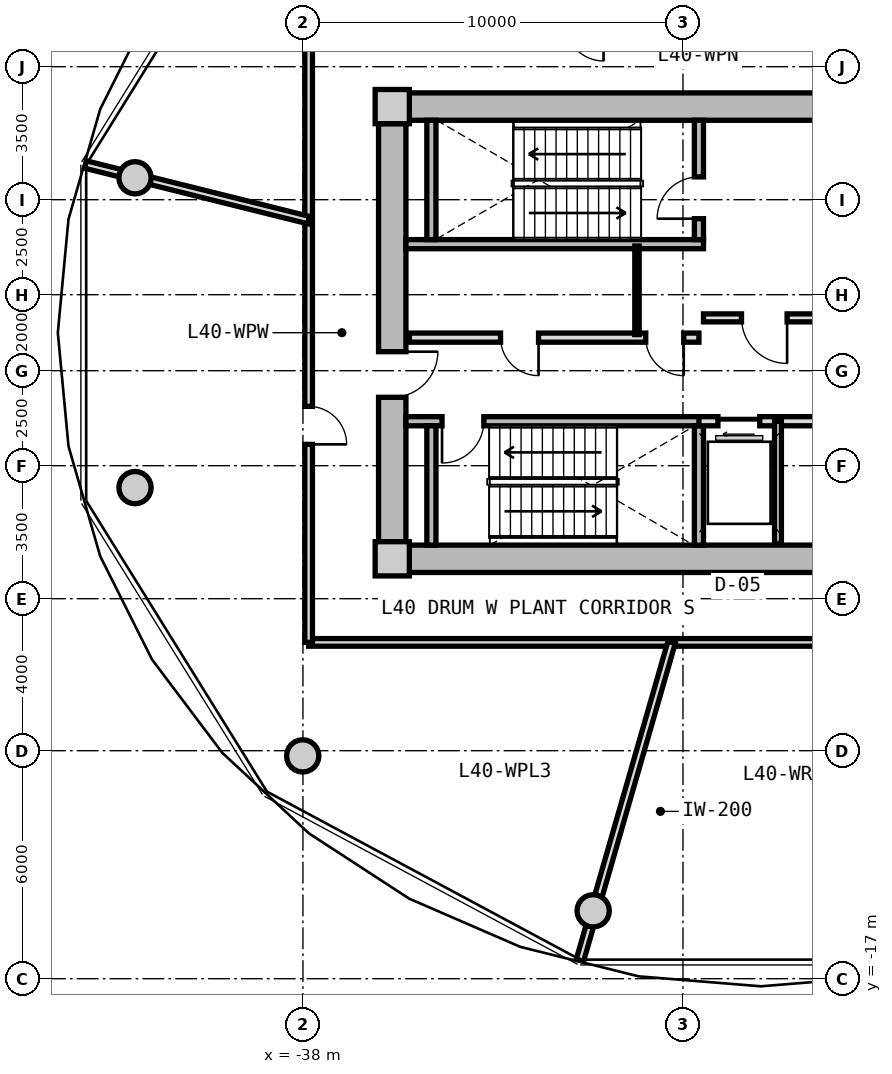
"""IFC4 building model, lengths in metres.
Left out: names, types, materials, properties, quantities, classifications, styles, units other than length and angle.
Written with IfcOpenShell. Run it as: python <this file> out.ifc"""

import sys

from ifc_helpers import new_model, si_unit, direction, frame, frame_2d, origin, origin_2d, place, context, subcontext, project, spatial, rectangle, circle, extrude, source, transform, mapped, element, fill, save


model = new_model("IFC4")
c1 = context("Model", 3, precision=1e-05, world=origin(), true_north=direction((0.0, 1.0)))
c2 = subcontext(c1, "Body", "Model", "MODEL_VIEW")
j1 = project(units=[si_unit("LENGTHUNIT", "METRE"), si_unit("PLANEANGLEUNIT", "RADIAN")], contexts=[c1])
p1 = place(None, origin())
s1 = spatial("IfcSite", under=j1, at=p1, CompositionType="ELEMENT")
p2 = place(p1, origin())
s2 = spatial("IfcBuilding", under=s1, at=p2, CompositionType="ELEMENT")
p3 = place(p2, frame((0.0, 0.0, 129.8)))
s3 = spatial("IfcBuildingStorey", under=s2, at=p3, CompositionType="ELEMENT", Elevation=129.8)
m1 = source(origin(), c2, "Body", "SweptSolid", [
    extrude(rectangle(XDim=0.9, YDim=0.9, at=origin_2d()), origin(), (0.0, 0.0, 1.0), 4.5),
])
for number, where, z_axis, x_axis in (
    (1, (-35.65, -5.95, 0.0), (0.0, 0.0, 1.0), (1.0, 0.0, 0.0)),
    (2, (-35.65, 5.95, 0.0), (0.0, 0.0, 1.0), (1.0, 0.0, 0.0)),
):
    element("IfcColumn", number, at=place(p3, frame(where, z_axis=z_axis, x_axis=x_axis)), inside=s3, PredefinedType="COLUMN", context=c2, shape_type="MappedRepresentation", body=[
        mapped(m1, transform((0.0, 0.0, 0.0), x_axis=(1.0, 0.0, 0.0), y_axis=(0.0, 1.0, 0.0), z_axis=(0.0, 0.0, 1.0), scale=1.0)),
    ])
m2 = source(origin(), c2, "Body", "SweptSolid", [
    extrude(rectangle(XDim=14.4, YDim=0.72, at=frame_2d((7.2, 0.0))), origin(), (0.0, 0.0, 1.0), 4.08),
])
for number, where, z_axis, x_axis in (
    (3, (-35.2, 5.95, 0.0), (0.0, 0.0, 1.0), (1.0, 0.0, 0.0)),
    (4, (-20.8, -5.95, 0.0), (0.0, 0.0, 1.0), (-1.0, 0.0, 0.0)),
):
    element("IfcWall", number, at=place(p3, frame(where, z_axis=z_axis, x_axis=x_axis)), inside=s3, PredefinedType="SHEAR", context=c2, shape_type="MappedRepresentation", body=[
        mapped(m2, transform((0.0, 0.0, 0.0), x_axis=(1.0, 0.0, 0.0), y_axis=(0.0, 1.0, 0.0), z_axis=(0.0, 0.0, 1.0), scale=1.0)),
    ])
m3 = source(origin(), c2, "Body", "SweptSolid", [
    extrude(rectangle(XDim=11.0, YDim=0.72, at=frame_2d((5.5, 0.0))), origin(), (0.0, 0.0, 1.0), 4.08),
])
p4 = place(p3, frame((-35.65, -5.5, 0.0), z_axis=(0.0, 0.0, 1.0), x_axis=(0.0, 1.0, 0.0)))
e5 = element("IfcWall", 5, at=p4, inside=s3, PredefinedType="SHEAR", context=c2, shape_type="MappedRepresentation", body=[
    mapped(m3, transform((0.0, 0.0, 0.0), x_axis=(1.0, 0.0, 0.0), y_axis=(0.0, 1.0, 0.0), z_axis=(0.0, 0.0, 1.0), scale=1.0)),
])
p5 = place(p4, frame((3.8, 0.0, 0.0)))
e6 = element("IfcOpeningElement", 6, at=p5, cuts=e5, PredefinedType="OPENING", context=c2, shape_type="SweptSolid", body=[
    extrude(rectangle(XDim=1.2, YDim=2.15, at=frame_2d((0.6, 1.075))), frame((0.0, 0.37, 0.0), z_axis=(0.0, -1.0, 0.0), x_axis=(1.0, 0.0, 0.0)), (0.0, 0.0, 1.0), 0.74),
])
m4 = source(origin(), c2, "Body", "SweptSolid", [
    extrude(circle(Radius=0.425, at=origin_2d()), origin(), (0.0, 0.0, 1.0), 4.08),
])
for number, where, z_axis, x_axis in (
    (7, (-42.419, 4.076, 0.0), (0.0, 0.0, 1.0), (1.0, 0.0, 0.0)),
    (8, (-42.419, -4.076, 0.0), (0.0, 0.0, 1.0), (1.0, 0.0, 0.0)),
    (9, (-38.006, -11.137, 0.0), (0.0, 0.0, 1.0), (1.0, 0.0, 0.0)),
    (10, (-30.363, -15.213, 0.0), (0.0, 0.0, 1.0), (1.0, 0.0, 0.0)),
):
    element("IfcColumn", number, at=place(p3, frame(where, z_axis=z_axis, x_axis=x_axis)), inside=s3, PredefinedType="COLUMN", context=c2, shape_type="MappedRepresentation", body=[
        mapped(m4, transform((0.0, 0.0, 0.0), x_axis=(1.0, 0.0, 0.0), y_axis=(0.0, 1.0, 0.0), z_axis=(0.0, 0.0, 1.0), scale=1.0)),
    ])
m5 = source(origin(), c2, "Body", "SweptSolid", [
    extrude(rectangle(XDim=7.83, YDim=0.24, at=frame_2d((3.915, 0.0))), origin(), (0.0, 0.0, 1.0), 4.08),
])
p6 = place(p3, frame((-35.29, 2.33, 0.0), z_axis=(0.0, 0.0, 1.0), x_axis=(1.0, 0.0, 0.0)))
e11 = element("IfcWall", 11, at=p6, inside=s3, PredefinedType="PARTITIONING", context=c2, shape_type="MappedRepresentation", body=[
    mapped(m5, transform((0.0, 0.0, 0.0), x_axis=(1.0, 0.0, 0.0), y_axis=(0.0, 1.0, 0.0), z_axis=(0.0, 0.0, 1.0), scale=1.0)),
])
m6 = source(origin(), c2, "Body", "SweptSolid", [
    extrude(rectangle(XDim=3.14, YDim=0.24, at=frame_2d((1.57, 0.0))), origin(), (0.0, 0.0, 1.0), 4.08),
])
p7 = place(p3, frame((-34.62, 2.45, 0.0), z_axis=(0.0, 0.0, 1.0), x_axis=(0.0, 1.0, 0.0)))
e12 = element("IfcWall", 12, at=p7, inside=s3, PredefinedType="PARTITIONING", context=c2, shape_type="MappedRepresentation", body=[
    mapped(m6, transform((0.0, 0.0, 0.0), x_axis=(1.0, 0.0, 0.0), y_axis=(0.0, 1.0, 0.0), z_axis=(0.0, 0.0, 1.0), scale=1.0)),
])
p8 = place(p3, frame((-27.58, 2.45, 0.0), z_axis=(0.0, 0.0, 1.0), x_axis=(0.0, 1.0, 0.0)))
e13 = element("IfcWall", 13, at=p8, inside=s3, PredefinedType="PARTITIONING", context=c2, shape_type="MappedRepresentation", body=[
    mapped(m6, transform((0.0, 0.0, 0.0), x_axis=(1.0, 0.0, 0.0), y_axis=(0.0, 1.0, 0.0), z_axis=(0.0, 0.0, 1.0), scale=1.0)),
])
p9 = place(p8, frame((0.55, 0.0, 0.0)))
e14 = element("IfcOpeningElement", 14, at=p9, cuts=e13, PredefinedType="OPENING", context=c2, shape_type="SweptSolid", body=[
    extrude(rectangle(XDim=1.1, YDim=2.15, at=frame_2d((0.55, 1.075))), frame((0.0, 0.13, 0.0), z_axis=(0.0, -1.0, 0.0), x_axis=(1.0, 0.0, 0.0)), (0.0, 0.0, 1.0), 0.26),
])
p10 = place(p3, frame((-35.29, -2.33, 0.0), z_axis=(0.0, 0.0, 1.0), x_axis=(1.0, 0.0, 0.0)))
e15 = element("IfcWall", 15, at=p10, inside=s3, PredefinedType="PARTITIONING", context=c2, shape_type="MappedRepresentation", body=[
    mapped(m5, transform((0.0, 0.0, 0.0), x_axis=(1.0, 0.0, 0.0), y_axis=(0.0, 1.0, 0.0), z_axis=(0.0, 0.0, 1.0), scale=1.0)),
])
p11 = place(p10, frame((0.95, 0.0, 0.0)))
e16 = element("IfcOpeningElement", 16, at=p11, cuts=e15, PredefinedType="OPENING", context=c2, shape_type="SweptSolid", body=[
    extrude(rectangle(XDim=1.1, YDim=2.15, at=frame_2d((0.55, 1.075))), frame((0.0, 0.13, 0.0), z_axis=(0.0, -1.0, 0.0), x_axis=(1.0, 0.0, 0.0)), (0.0, 0.0, 1.0), 0.26),
])
for number, where, z_axis, x_axis in (
    (17, (-34.62, -5.59, 0.0), (0.0, 0.0, 1.0), (0.0, 1.0, 0.0)),
    (18, (-27.58, -5.59, 0.0), (0.0, 0.0, 1.0), (0.0, 1.0, 0.0)),
):
    element("IfcWall", number, at=place(p3, frame(where, z_axis=z_axis, x_axis=x_axis)), inside=s3, PredefinedType="PARTITIONING", context=c2, shape_type="MappedRepresentation", body=[
        mapped(m6, transform((0.0, 0.0, 0.0), x_axis=(1.0, 0.0, 0.0), y_axis=(0.0, 1.0, 0.0), z_axis=(0.0, 0.0, 1.0), scale=1.0)),
    ])
m7 = source(origin(), c2, "Body", "SweptSolid", [
    extrude(rectangle(XDim=6.66, YDim=0.21, at=frame_2d((3.33, 0.0))), origin(), (0.0, 0.0, 1.0), 4.065),
])
p12 = place(p3, frame((-27.46, 0.39, 0.0), z_axis=(0.0, 0.0, 1.0), x_axis=(1.0, 0.0, 0.0)))
e19 = element("IfcWall", 19, at=p12, inside=s3, PredefinedType="PARTITIONING", context=c2, shape_type="MappedRepresentation", body=[
    mapped(m7, transform((0.0, 0.0, 0.0), x_axis=(1.0, 0.0, 0.0), y_axis=(0.0, 1.0, 0.0), z_axis=(0.0, 0.0, 1.0), scale=1.0)),
])
p13 = place(p12, frame((1.0, 0.0, 0.0)))
e20 = element("IfcOpeningElement", 20, at=p13, cuts=e19, PredefinedType="OPENING", context=c2, shape_type="SweptSolid", body=[
    extrude(rectangle(XDim=1.2, YDim=2.15, at=frame_2d((0.6, 1.075))), frame((0.0, 0.115, 0.0), z_axis=(0.0, -1.0, 0.0), x_axis=(1.0, 0.0, 0.0)), (0.0, 0.0, 1.0), 0.23),
])
m8 = source(origin(), c2, "Body", "SweptSolid", [
    extrude(rectangle(XDim=7.62, YDim=0.24, at=frame_2d((3.81, 0.0))), origin(), (0.0, 0.0, 1.0), 4.065),
])
p14 = place(p3, frame((-35.2, -0.13, 0.0), z_axis=(0.0, 0.0, 1.0), x_axis=(1.0, 0.0, 0.0)))
e21 = element("IfcWall", 21, at=p14, inside=s3, PredefinedType="PARTITIONING", context=c2, shape_type="MappedRepresentation", body=[
    mapped(m8, transform((0.0, 0.0, 0.0), x_axis=(1.0, 0.0, 0.0), y_axis=(0.0, 1.0, 0.0), z_axis=(0.0, 0.0, 1.0), scale=1.0)),
])
p15 = place(p14, frame((6.22, 0.0, 0.0)))
e22 = element("IfcOpeningElement", 22, at=p15, cuts=e21, PredefinedType="OPENING", context=c2, shape_type="SweptSolid", body=[
    extrude(rectangle(XDim=1.0, YDim=2.1, at=frame_2d((0.5, 1.05))), frame((0.0, 0.13, 0.0), z_axis=(0.0, -1.0, 0.0), x_axis=(1.0, 0.0, 0.0)), (0.0, 0.0, 1.0), 0.26),
])
p16 = place(p14, frame((2.4, 0.0, 0.0)))
e23 = element("IfcOpeningElement", 23, at=p16, cuts=e21, PredefinedType="OPENING", context=c2, shape_type="SweptSolid", body=[
    extrude(rectangle(XDim=1.0, YDim=2.1, at=frame_2d((0.5, 1.05))), frame((0.0, 0.13, 0.0), z_axis=(0.0, -1.0, 0.0), x_axis=(1.0, 0.0, 0.0)), (0.0, 0.0, 1.0), 0.26),
])
m9 = source(origin(), c2, "Body", "SweptSolid", [
    extrude(rectangle(XDim=2.33, YDim=0.115, at=frame_2d((1.165, 0.0))), origin(), (0.0, 0.0, 1.0), 4.065),
])
p17 = place(p3, frame((-29.21, -0.05, 0.0), z_axis=(0.0, 0.0, 1.0), x_axis=(0.0, 1.0, 0.0)))
e24 = element("IfcWall", 24, at=p17, inside=s3, PredefinedType="PARTITIONING", context=c2, shape_type="MappedRepresentation", body=[
    mapped(m9, transform((0.0, 0.0, 0.0), x_axis=(1.0, 0.0, 0.0), y_axis=(0.0, 1.0, 0.0), z_axis=(0.0, 0.0, 1.0), scale=1.0)),
])
m10 = source(origin(), c2, "Body", "SweptSolid", [
    extrude(rectangle(XDim=4.13, YDim=0.24, at=frame_2d((2.065, 0.0))), origin(), (0.0, 0.0, 1.0), 4.065),
])
p18 = place(p3, frame((-27.58, -2.33, 0.0), z_axis=(0.0, 0.0, 1.0), x_axis=(1.0, 0.0, 0.0)))
e25 = element("IfcWall", 25, at=p18, inside=s3, PredefinedType="PARTITIONING", context=c2, shape_type="MappedRepresentation", body=[
    mapped(m10, transform((0.0, 0.0, 0.0), x_axis=(1.0, 0.0, 0.0), y_axis=(0.0, 1.0, 0.0), z_axis=(0.0, 0.0, 1.0), scale=1.0)),
])
p19 = place(p18, frame((0.5, 0.0, 0.0)))
e26 = element("IfcOpeningElement", 26, at=p19, cuts=e25, PredefinedType="OPENING", context=c2, shape_type="SweptSolid", body=[
    extrude(rectangle(XDim=1.1, YDim=2.2, at=frame_2d((0.55, 1.1))), frame((0.0, 0.13, 0.0), z_axis=(0.0, -1.0, 0.0), x_axis=(1.0, 0.0, 0.0)), (0.0, 0.0, 1.0), 0.26),
])
m11 = source(origin(), c2, "Body", "SweptSolid", [
    extrude(rectangle(XDim=3.22, YDim=0.18, at=frame_2d((1.61, 0.0))), origin(), (0.0, 0.0, 1.0), 4.065),
])
p20 = place(p3, frame((-25.5, -5.55, 0.0), z_axis=(0.0, 0.0, 1.0), x_axis=(0.0, 1.0, 0.0)))
e27 = element("IfcWall", 27, at=p20, inside=s3, PredefinedType="PARTITIONING", context=c2, shape_type="MappedRepresentation", body=[
    mapped(m11, transform((0.0, 0.0, 0.0), x_axis=(1.0, 0.0, 0.0), y_axis=(0.0, 1.0, 0.0), z_axis=(0.0, 0.0, 1.0), scale=1.0)),
])
m12 = source(origin(), c2, "Body", "SweptSolid", [
    extrude(rectangle(XDim=19.7, YDim=0.2, at=frame_2d((9.85, 0.0))), origin(), (0.0, 0.0, 1.0), 4.065),
])
p21 = place(p3, frame((-18.15, -8.15, 0.0), z_axis=(0.0, 0.0, 1.0), x_axis=(-1.0, 0.0, 0.0)))
e28 = element("IfcWall", 28, at=p21, inside=s3, PredefinedType="PARTITIONING", context=c2, shape_type="MappedRepresentation", body=[
    mapped(m12, transform((0.0, 0.0, 0.0), x_axis=(1.0, 0.0, 0.0), y_axis=(0.0, 1.0, 0.0), z_axis=(0.0, 0.0, 1.0), scale=1.0)),
])
p22 = place(p21, frame((4.586, 0.0, 0.0)))
e29 = element("IfcOpeningElement", 29, at=p22, cuts=e28, PredefinedType="OPENING", context=c2, shape_type="SweptSolid", body=[
    extrude(rectangle(XDim=1.25, YDim=2.2, at=frame_2d((0.625, 1.1))), frame((0.0, 0.11, 0.0), z_axis=(0.0, -1.0, 0.0), x_axis=(1.0, 0.0, 0.0)), (0.0, 0.0, 1.0), 0.22),
])
m13 = source(origin(), c2, "Body", "SweptSolid", [
    extrude(rectangle(XDim=16.3, YDim=0.2, at=frame_2d((8.15, 0.0))), origin(), (0.0, 0.0, 1.0), 4.065),
])
p23 = place(p3, frame((-37.85, -8.15, 0.0), z_axis=(0.0, 0.0, 1.0), x_axis=(0.0, 1.0, 0.0)))
e30 = element("IfcWall", 30, at=p23, inside=s3, PredefinedType="PARTITIONING", context=c2, shape_type="MappedRepresentation", body=[
    mapped(m13, transform((0.0, 0.0, 0.0), x_axis=(1.0, 0.0, 0.0), y_axis=(0.0, 1.0, 0.0), z_axis=(0.0, 0.0, 1.0), scale=1.0)),
])
p24 = place(p23, frame((5.211, 0.0, 0.0)))
e31 = element("IfcOpeningElement", 31, at=p24, cuts=e30, PredefinedType="OPENING", context=c2, shape_type="SweptSolid", body=[
    extrude(rectangle(XDim=1.0, YDim=2.1, at=frame_2d((0.5, 1.05))), frame((0.0, 0.11, 0.0), z_axis=(0.0, -1.0, 0.0), x_axis=(1.0, 0.0, 0.0)), (0.0, 0.0, 1.0), 0.22),
])
m14 = source(origin(), c2, "Body", "SweptSolid", [
    extrude(rectangle(XDim=8.708, YDim=0.2, at=frame_2d((4.354, 0.0))), origin(), (0.0, 0.0, 1.0), 4.065),
])
p25 = place(p3, frame((-28.3, -8.15, 0.0), z_axis=(0.0, 0.0, 1.0), x_axis=(-0.277019790717, -0.960864212858, 0.0)))
e32 = element("IfcWall", 32, at=p25, inside=s3, PredefinedType="PARTITIONING", context=c2, shape_type="MappedRepresentation", body=[
    mapped(m14, transform((0.0, 0.0, 0.0), x_axis=(1.0, 0.0, 0.0), y_axis=(0.0, 1.0, 0.0), z_axis=(0.0, 0.0, 1.0), scale=1.0)),
])
m15 = source(origin(), c2, "Body", "SweptSolid", [
    extrude(rectangle(XDim=6.052, YDim=0.2, at=frame_2d((3.026, 0.0))), origin(), (0.0, 0.0, 1.0), 4.065),
])
p26 = place(p3, frame((-37.85, 2.963, 0.0), z_axis=(0.0, 0.0, 1.0), x_axis=(-0.970369863069, 0.24162435483, 0.0)))
e33 = element("IfcWall", 33, at=p26, inside=s3, PredefinedType="PARTITIONING", context=c2, shape_type="MappedRepresentation", body=[
    mapped(m15, transform((0.0, 0.0, 0.0), x_axis=(1.0, 0.0, 0.0), y_axis=(0.0, 1.0, 0.0), z_axis=(0.0, 0.0, 1.0), scale=1.0)),
])
m16 = source(origin(), c2, "Body", "SweptSolid", [
    extrude(rectangle(XDim=1.1, YDim=2.15, at=frame_2d((0.55, 1.075))), frame((0.0, 0.025, 0.0), z_axis=(0.0, -1.0, 0.0), x_axis=(1.0, 0.0, 0.0)), (0.0, 0.0, 1.0), 0.05),
])
p27 = place(p9, origin())
e34 = element("IfcDoor", 34, at=p27, inside=s3, OperationType="SINGLE_SWING_LEFT", PredefinedType="DOOR", context=c2, shape_type="MappedRepresentation", body=[
    mapped(m16, transform((0.0, 0.0, 0.0), x_axis=(1.0, 0.0, 0.0), y_axis=(0.0, 1.0, 0.0), z_axis=(0.0, 0.0, 1.0), scale=1.0)),
])
fill(e14, e34)
p28 = place(p11, frame((1.1, 0.0, 0.0), z_axis=(0.0, 0.0, 1.0), x_axis=(-1.0, 0.0, 0.0)))
e35 = element("IfcDoor", 35, at=p28, inside=s3, OperationType="SINGLE_SWING_RIGHT", PredefinedType="DOOR", context=c2, shape_type="MappedRepresentation", body=[
    mapped(m16, transform((0.0, 0.0, 0.0), x_axis=(1.0, 0.0, 0.0), y_axis=(0.0, 1.0, 0.0), z_axis=(0.0, 0.0, 1.0), scale=1.0)),
])
fill(e16, e35)
m17 = source(origin(), c2, "Body", "SweptSolid", [
    extrude(rectangle(XDim=1.2, YDim=2.15, at=frame_2d((0.6, 1.075))), frame((0.0, 0.025, 0.0), z_axis=(0.0, -1.0, 0.0), x_axis=(1.0, 0.0, 0.0)), (0.0, 0.0, 1.0), 0.05),
])
p29 = place(p13, frame((1.2, 0.0, 0.0), z_axis=(0.0, 0.0, 1.0), x_axis=(-1.0, 0.0, 0.0)))
e36 = element("IfcDoor", 36, at=p29, inside=s3, OperationType="SINGLE_SWING_LEFT", PredefinedType="DOOR", context=c2, shape_type="MappedRepresentation", body=[
    mapped(m17, transform((0.0, 0.0, 0.0), x_axis=(1.0, 0.0, 0.0), y_axis=(0.0, 1.0, 0.0), z_axis=(0.0, 0.0, 1.0), scale=1.0)),
])
fill(e20, e36)
p30 = place(p5, frame((1.2, 0.0, 0.0), z_axis=(0.0, 0.0, 1.0), x_axis=(-1.0, 0.0, 0.0)))
e37 = element("IfcDoor", 37, at=p30, inside=s3, OperationType="SINGLE_SWING_LEFT", PredefinedType="DOOR", context=c2, shape_type="MappedRepresentation", body=[
    mapped(m17, transform((0.0, 0.0, 0.0), x_axis=(1.0, 0.0, 0.0), y_axis=(0.0, 1.0, 0.0), z_axis=(0.0, 0.0, 1.0), scale=1.0)),
])
fill(e6, e37)
m18 = source(origin(), c2, "Body", "SweptSolid", [
    extrude(rectangle(XDim=1.0, YDim=2.1, at=frame_2d((0.5, 1.05))), frame((0.0, 0.025, 0.0), z_axis=(0.0, -1.0, 0.0), x_axis=(1.0, 0.0, 0.0)), (0.0, 0.0, 1.0), 0.05),
])
p31 = place(p15, frame((1.0, 0.0, 0.0), z_axis=(0.0, 0.0, 1.0), x_axis=(-1.0, 0.0, 0.0)))
e38 = element("IfcDoor", 38, at=p31, inside=s3, OperationType="SINGLE_SWING_LEFT", PredefinedType="DOOR", context=c2, shape_type="MappedRepresentation", body=[
    mapped(m18, transform((0.0, 0.0, 0.0), x_axis=(1.0, 0.0, 0.0), y_axis=(0.0, 1.0, 0.0), z_axis=(0.0, 0.0, 1.0), scale=1.0)),
])
fill(e22, e38)
p32 = place(p16, frame((1.0, 0.0, 0.0), z_axis=(0.0, 0.0, 1.0), x_axis=(-1.0, 0.0, 0.0)))
e39 = element("IfcDoor", 39, at=p32, inside=s3, OperationType="SINGLE_SWING_LEFT", PredefinedType="DOOR", context=c2, shape_type="MappedRepresentation", body=[
    mapped(m18, transform((0.0, 0.0, 0.0), x_axis=(1.0, 0.0, 0.0), y_axis=(0.0, 1.0, 0.0), z_axis=(0.0, 0.0, 1.0), scale=1.0)),
])
fill(e23, e39)
m19 = source(origin(), c2, "Body", "SweptSolid", [
    extrude(rectangle(XDim=1.1, YDim=2.2, at=frame_2d((0.55, 1.1))), frame((0.0, 0.025, 0.0), z_axis=(0.0, -1.0, 0.0), x_axis=(1.0, 0.0, 0.0)), (0.0, 0.0, 1.0), 0.05),
])
p33 = place(p19, frame((1.1, 0.0, 0.0), z_axis=(0.0, 0.0, 1.0), x_axis=(-1.0, 0.0, 0.0)))
e40 = element("IfcDoor", 40, at=p33, inside=s3, OperationType="SLIDING_TO_LEFT", PredefinedType="DOOR", context=c2, shape_type="MappedRepresentation", body=[
    mapped(m19, transform((0.0, 0.0, 0.0), x_axis=(1.0, 0.0, 0.0), y_axis=(0.0, 1.0, 0.0), z_axis=(0.0, 0.0, 1.0), scale=1.0)),
])
fill(e26, e40)
p34 = place(p24, frame((1.0, 0.0, 0.0), z_axis=(0.0, 0.0, 1.0), x_axis=(-1.0, 0.0, 0.0)))
e41 = element("IfcDoor", 41, at=p34, inside=s3, OperationType="SINGLE_SWING_RIGHT", PredefinedType="DOOR", context=c2, shape_type="MappedRepresentation", body=[
    mapped(m18, transform((0.0, 0.0, 0.0), x_axis=(1.0, 0.0, 0.0), y_axis=(0.0, 1.0, 0.0), z_axis=(0.0, 0.0, 1.0), scale=1.0)),
])
fill(e31, e41)
save(model, sys.argv[1])
